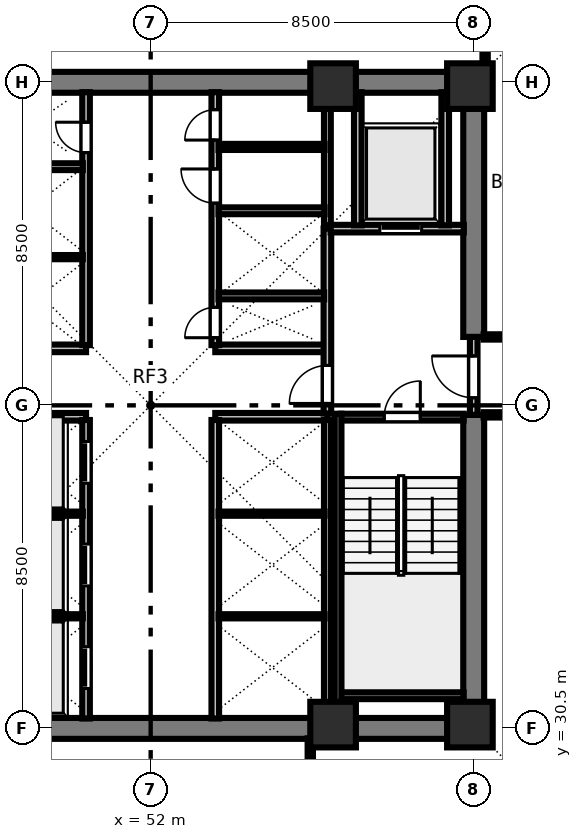
"""IFC4 building model, lengths in metres.
Left out: names, types, materials, properties, quantities, classifications, styles, units other than length and angle.
Written with IfcOpenShell. Run it as: python <this file> out.ifc"""

import sys

from ifc_helpers import new_model, si_unit, direction, frame, frame_2d, origin, origin_2d, place, context, subcontext, project, spatial, rectangle, extrude, element, fill, save


model = new_model("IFC4")
c1 = context("Model", 3, precision=1e-05, world=origin(), true_north=direction((0.0, 1.0)))
c2 = subcontext(c1, "Body", "Model", "MODEL_VIEW")
j1 = project(units=[si_unit("LENGTHUNIT", "METRE"), si_unit("PLANEANGLEUNIT", "RADIAN")], contexts=[c1])
p1 = place(None, origin())
s1 = spatial("IfcSite", under=j1, at=p1, CompositionType="ELEMENT")
p2 = place(p1, origin())
s2 = spatial("IfcBuilding", under=s1, at=p2, CompositionType="ELEMENT")
p3 = place(p2, frame((0.0, 0.0, 23.5)))
s3 = spatial("IfcBuildingStorey", under=s2, at=p3, CompositionType="ELEMENT", Elevation=23.5)
for number, where, z_axis, x_axis in (
    (1, (56.8, 30.6, 0.0), (0.0, 0.0, 1.0), (1.0, 0.0, 0.0)),
    (2, (60.4, 30.6, 0.0), (0.0, 0.0, 1.0), (1.0, 0.0, 0.0)),
    (3, (56.8, 47.4, 0.0), (0.0, 0.0, 1.0), (1.0, 0.0, 0.0)),
    (4, (60.4, 47.4, 0.0), (0.0, 0.0, 1.0), (1.0, 0.0, 0.0)),
):
    element("IfcColumn", number, at=place(p3, frame(where, z_axis=z_axis, x_axis=x_axis)), inside=s3, PredefinedType="COLUMN", context=c2, shape_type="SweptSolid", body=[
        extrude(rectangle(XDim=1.2, YDim=1.2, at=origin_2d()), origin(), (0.0, 0.0, 1.0), 3.5),
    ])
for number, where, z_axis, x_axis in (
    (5, (43.225, 30.5, 0.0), (0.0, 0.0, 1.0), (1.0, 0.0, 0.0)),
    (6, (43.225, 47.5, 0.0), (0.0, 0.0, 1.0), (1.0, 0.0, 0.0)),
):
    element("IfcWall", number, at=place(p3, frame(where, z_axis=z_axis, x_axis=x_axis)), inside=s3, PredefinedType="SHEAR", context=c2, shape_type="SweptSolid", body=[
        extrude(rectangle(XDim=17.55, YDim=0.55, at=frame_2d((8.775, 0.0))), origin(), (0.0, 0.0, 1.0), 3.28),
    ])
p4 = place(p3, frame((60.5, 30.765, 0.0), z_axis=(0.0, 0.0, 1.0), x_axis=(0.0, 1.0, 0.0)))
e7 = element("IfcWall", 7, at=p4, inside=s3, PredefinedType="SHEAR", context=c2, shape_type="SweptSolid", body=[
    extrude(rectangle(XDim=7.985, YDim=0.55, at=frame_2d((3.993, 0.0))), origin(), (0.0, 0.0, 1.0), 3.28),
])
p5 = place(p3, frame((60.5, 40.8, 0.0), z_axis=(0.0, 0.0, 1.0), x_axis=(0.0, 1.0, 0.0)))
e8 = element("IfcWall", 8, at=p5, inside=s3, PredefinedType="SHEAR", context=c2, shape_type="SweptSolid", body=[
    extrude(rectangle(XDim=6.435, YDim=0.55, at=frame_2d((3.218, 0.0))), origin(), (0.0, 0.0, 1.0), 3.28),
])
for number, where, z_axis, x_axis in (
    (9, (47.35, 38.7, 0.0), (0.0, 0.0, 1.0), (1.0, 0.0, 0.0)),
    (10, (47.35, 40.5, 0.0), (0.0, 0.0, 1.0), (1.0, 0.0, 0.0)),
    (11, (53.7, 38.7, 0.0), (0.0, 0.0, 1.0), (1.0, 0.0, 0.0)),
    (12, (53.7, 40.5, 0.0), (0.0, 0.0, 1.0), (1.0, 0.0, 0.0)),
):
    element("IfcWall", number, at=place(p3, frame(where, z_axis=z_axis, x_axis=x_axis)), inside=s3, PredefinedType="SOLIDWALL", context=c2, shape_type="SweptSolid", body=[
        extrude(rectangle(XDim=2.95, YDim=0.2, at=frame_2d((1.475, 0.0))), origin(), (0.0, 0.0, 1.0), 3.28),
    ])
p6 = place(p3, frame((50.3, 30.76, 0.0), z_axis=(0.0, 0.0, 1.0), x_axis=(0.0, 1.0, 0.0)))
e13 = element("IfcWall", 13, at=p6, inside=s3, PredefinedType="SOLIDWALL", context=c2, shape_type="SweptSolid", body=[
    extrude(rectangle(XDim=7.855, YDim=0.2, at=frame_2d((3.927, 0.0))), origin(), (0.0, 0.0, 1.0), 3.28),
])
p7 = place(p6, frame((0.79, 0.0, 0.0)))
e14 = element("IfcOpeningElement", 14, at=p7, cuts=e13, PredefinedType="OPENING", context=c2, shape_type="SweptSolid", body=[
    extrude(rectangle(XDim=1.1, YDim=2.2, at=frame_2d((0.55, 1.1))), frame((0.0, 0.11, 0.0), z_axis=(0.0, -1.0, 0.0), x_axis=(1.0, 0.0, 0.0)), (0.0, 0.0, 1.0), 0.22),
])
p8 = place(p6, frame((3.49, 0.0, 0.0)))
e15 = element("IfcOpeningElement", 15, at=p8, cuts=e13, PredefinedType="OPENING", context=c2, shape_type="SweptSolid", body=[
    extrude(rectangle(XDim=1.1, YDim=2.2, at=frame_2d((0.55, 1.1))), frame((0.0, 0.11, 0.0), z_axis=(0.0, -1.0, 0.0), x_axis=(1.0, 0.0, 0.0)), (0.0, 0.0, 1.0), 0.22),
])
p9 = place(p6, frame((6.19, 0.0, 0.0)))
e16 = element("IfcOpeningElement", 16, at=p9, cuts=e13, PredefinedType="OPENING", context=c2, shape_type="SweptSolid", body=[
    extrude(rectangle(XDim=1.1, YDim=2.2, at=frame_2d((0.55, 1.1))), frame((0.0, 0.11, 0.0), z_axis=(0.0, -1.0, 0.0), x_axis=(1.0, 0.0, 0.0)), (0.0, 0.0, 1.0), 0.22),
])
p10 = place(p3, frame((53.7, 30.76, 0.0), z_axis=(0.0, 0.0, 1.0), x_axis=(0.0, 1.0, 0.0)))
e17 = element("IfcWall", 17, at=p10, inside=s3, PredefinedType="SOLIDWALL", context=c2, shape_type="SweptSolid", body=[
    extrude(rectangle(XDim=7.855, YDim=0.2, at=frame_2d((3.927, 0.0))), origin(), (0.0, 0.0, 1.0), 3.28),
])
p11 = place(p3, frame((50.3, 40.585, 0.0), z_axis=(0.0, 0.0, 1.0), x_axis=(0.0, 1.0, 0.0)))
e18 = element("IfcWall", 18, at=p11, inside=s3, PredefinedType="SOLIDWALL", context=c2, shape_type="SweptSolid", body=[
    extrude(rectangle(XDim=6.655, YDim=0.2, at=frame_2d((3.328, 0.0))), origin(), (0.0, 0.0, 1.0), 3.28),
])
p12 = place(p11, frame((5.065, 0.0, 0.0)))
e19 = element("IfcOpeningElement", 19, at=p12, cuts=e18, PredefinedType="OPENING", context=c2, shape_type="SweptSolid", body=[
    extrude(rectangle(XDim=0.8, YDim=2.08, at=frame_2d((0.4, 1.04))), frame((0.0, 0.11, 0.0), z_axis=(0.0, -1.0, 0.0), x_axis=(1.0, 0.0, 0.0)), (0.0, 0.0, 1.0), 0.22),
])
p13 = place(p3, frame((53.7, 40.585, 0.0), z_axis=(0.0, 0.0, 1.0), x_axis=(0.0, 1.0, 0.0)))
e20 = element("IfcWall", 20, at=p13, inside=s3, PredefinedType="SOLIDWALL", context=c2, shape_type="SweptSolid", body=[
    extrude(rectangle(XDim=6.655, YDim=0.2, at=frame_2d((3.328, 0.0))), origin(), (0.0, 0.0, 1.0), 3.28),
])
p14 = place(p13, frame((0.195, 0.0, 0.0)))
e21 = element("IfcOpeningElement", 21, at=p14, cuts=e20, PredefinedType="OPENING", context=c2, shape_type="SweptSolid", body=[
    extrude(rectangle(XDim=0.8, YDim=2.08, at=frame_2d((0.4, 1.04))), frame((0.0, 0.11, 0.0), z_axis=(0.0, -1.0, 0.0), x_axis=(1.0, 0.0, 0.0)), (0.0, 0.0, 1.0), 0.22),
])
p15 = place(p13, frame((3.735, 0.0, 0.0)))
e22 = element("IfcOpeningElement", 22, at=p15, cuts=e20, PredefinedType="OPENING", context=c2, shape_type="SweptSolid", body=[
    extrude(rectangle(XDim=0.9, YDim=2.12, at=frame_2d((0.45, 1.06))), frame((0.0, 0.11, 0.0), z_axis=(0.0, -1.0, 0.0), x_axis=(1.0, 0.0, 0.0)), (0.0, 0.0, 1.0), 0.22),
])
p16 = place(p13, frame((5.395, 0.0, 0.0)))
e23 = element("IfcOpeningElement", 23, at=p16, cuts=e20, PredefinedType="OPENING", context=c2, shape_type="SweptSolid", body=[
    extrude(rectangle(XDim=0.8, YDim=2.1, at=frame_2d((0.4, 1.05))), frame((0.0, 0.11, 0.0), z_axis=(0.0, -1.0, 0.0), x_axis=(1.0, 0.0, 0.0)), (0.0, 0.0, 1.0), 0.22),
])
p17 = place(p3, frame((60.5, 38.75, 0.0), z_axis=(0.0, 0.0, 1.0), x_axis=(0.0, 1.0, 0.0)))
e24 = element("IfcWall", 24, at=p17, inside=s3, PredefinedType="SOLIDWALL", context=c2, shape_type="SweptSolid", body=[
    extrude(rectangle(XDim=2.05, YDim=0.2, at=frame_2d((1.025, 0.0))), origin(), (0.0, 0.0, 1.0), 3.28),
])
p18 = place(p17, frame((0.45, 0.0, 0.0)))
e25 = element("IfcOpeningElement", 25, at=p18, cuts=e24, PredefinedType="OPENING", context=c2, shape_type="SweptSolid", body=[
    extrude(rectangle(XDim=1.1, YDim=2.15, at=frame_2d((0.55, 1.075))), frame((0.0, 0.11, 0.0), z_axis=(0.0, -1.0, 0.0), x_axis=(1.0, 0.0, 0.0)), (0.0, 0.0, 1.0), 0.22),
])
p19 = place(p3, frame((56.65, 38.785, 0.0), z_axis=(0.0, 0.0, 1.0), x_axis=(0.0, 1.0, 0.0)))
e26 = element("IfcWall", 26, at=p19, inside=s3, PredefinedType="SOLIDWALL", context=c2, shape_type="SweptSolid", body=[
    extrude(rectangle(XDim=4.865, YDim=0.2, at=frame_2d((2.433, 0.0))), origin(), (0.0, 0.0, 1.0), 3.28),
])
p20 = place(p19, frame((0.265, 0.0, 0.0)))
e27 = element("IfcOpeningElement", 27, at=p20, cuts=e26, PredefinedType="OPENING", context=c2, shape_type="SweptSolid", body=[
    extrude(rectangle(XDim=1.0, YDim=2.15, at=frame_2d((0.5, 1.075))), frame((0.0, 0.11, 0.0), z_axis=(0.0, -1.0, 0.0), x_axis=(1.0, 0.0, 0.0)), (0.0, 0.0, 1.0), 0.22),
])
p21 = place(p3, frame((56.735, 43.65, 0.0), z_axis=(0.0, 0.0, 1.0), x_axis=(1.0, 0.0, 0.0)))
e28 = element("IfcWall", 28, at=p21, inside=s3, PredefinedType="SOLIDWALL", context=c2, shape_type="SweptSolid", body=[
    extrude(rectangle(XDim=3.505, YDim=0.2, at=frame_2d((1.752, 0.0))), origin(), (0.0, 0.0, 1.0), 3.28),
])
p22 = place(p21, frame((1.295, 0.0, 0.0)))
e29 = element("IfcOpeningElement", 29, at=p22, cuts=e28, PredefinedType="OPENING", context=c2, shape_type="SweptSolid", body=[
    extrude(rectangle(XDim=1.1, YDim=2.2, at=frame_2d((0.55, 1.1))), frame((0.0, 0.11, 0.0), z_axis=(0.0, -1.0, 0.0), x_axis=(1.0, 0.0, 0.0)), (0.0, 0.0, 1.0), 0.22),
])
for number, where, z_axis, x_axis in (
    (30, (57.45, 43.735, 0.0), (0.0, 0.0, 1.0), (0.0, 1.0, 0.0)),
    (31, (59.75, 43.735, 0.0), (0.0, 0.0, 1.0), (0.0, 1.0, 0.0)),
):
    element("IfcWall", number, at=place(p3, frame(where, z_axis=z_axis, x_axis=x_axis)), inside=s3, PredefinedType="SOLIDWALL", context=c2, shape_type="SweptSolid", body=[
        extrude(rectangle(XDim=3.505, YDim=0.2, at=frame_2d((1.752, 0.0))), origin(), (0.0, 0.0, 1.0), 3.28),
    ])
for number, where, z_axis, x_axis in (
    (32, (47.425, 33.45, 0.0), (0.0, 0.0, 1.0), (1.0, 0.0, 0.0)),
    (33, (47.425, 36.15, 0.0), (0.0, 0.0, 1.0), (1.0, 0.0, 0.0)),
):
    element("IfcWall", number, at=place(p3, frame(where, z_axis=z_axis, x_axis=x_axis)), inside=s3, PredefinedType="PARTITIONING", context=c2, shape_type="SweptSolid", body=[
        extrude(rectangle(XDim=2.79, YDim=0.11, at=frame_2d((1.395, 0.0))), origin(), (0.0, 0.0, 1.0), 3.28),
    ])
p23 = place(p3, frame((56.65, 30.76, 0.0), z_axis=(0.0, 0.0, 1.0), x_axis=(0.0, 1.0, 0.0)))
e34 = element("IfcWall", 34, at=p23, inside=s3, PredefinedType="SOLIDWALL", context=c2, shape_type="SweptSolid", body=[
    extrude(rectangle(XDim=7.855, YDim=0.18, at=frame_2d((3.927, 0.0))), origin(), (0.0, 0.0, 1.0), 3.28),
])
for number, where, z_axis, x_axis in (
    (35, (53.785, 33.45, 0.0), (0.0, 0.0, 1.0), (1.0, 0.0, 0.0)),
    (36, (53.785, 36.15, 0.0), (0.0, 0.0, 1.0), (1.0, 0.0, 0.0)),
):
    element("IfcWall", number, at=place(p3, frame(where, z_axis=z_axis, x_axis=x_axis)), inside=s3, PredefinedType="PARTITIONING", context=c2, shape_type="SweptSolid", body=[
        extrude(rectangle(XDim=2.79, YDim=0.11, at=frame_2d((1.395, 0.0))), origin(), (0.0, 0.0, 1.0), 3.28),
    ])
p24 = place(p3, frame((47.435, 42.9, 0.0), z_axis=(0.0, 0.0, 1.0), x_axis=(1.0, 0.0, 0.0)))
e37 = element("IfcWall", 37, at=p24, inside=s3, PredefinedType="PARTITIONING", context=c2, shape_type="SweptSolid", body=[
    extrude(rectangle(XDim=2.78, YDim=0.11, at=frame_2d((1.39, 0.0))), origin(), (0.0, 0.0, 1.0), 3.28),
])
p25 = place(p3, frame((47.425, 45.28, 0.0), z_axis=(0.0, 0.0, 1.0), x_axis=(1.0, 0.0, 0.0)))
e38 = element("IfcWall", 38, at=p25, inside=s3, PredefinedType="SOLIDWALL", context=c2, shape_type="SweptSolid", body=[
    extrude(rectangle(XDim=2.79, YDim=0.18, at=frame_2d((1.395, 0.0))), origin(), (0.0, 0.0, 1.0), 3.28),
])
p26 = place(p3, frame((56.65, 43.735, 0.0), z_axis=(0.0, 0.0, 1.0), x_axis=(0.0, 1.0, 0.0)))
e39 = element("IfcWall", 39, at=p26, inside=s3, PredefinedType="SOLIDWALL", context=c2, shape_type="SweptSolid", body=[
    extrude(rectangle(XDim=3.505, YDim=0.18, at=frame_2d((1.752, 0.0))), origin(), (0.0, 0.0, 1.0), 3.28),
])
p27 = place(p3, frame((53.785, 41.88, 0.0), z_axis=(0.0, 0.0, 1.0), x_axis=(1.0, 0.0, 0.0)))
e40 = element("IfcWall", 40, at=p27, inside=s3, PredefinedType="SOLIDWALL", context=c2, shape_type="SweptSolid", body=[
    extrude(rectangle(XDim=2.78, YDim=0.18, at=frame_2d((1.39, 0.0))), origin(), (0.0, 0.0, 1.0), 3.28),
])
p28 = place(p3, frame((53.785, 44.12, 0.0), z_axis=(0.0, 0.0, 1.0), x_axis=(1.0, 0.0, 0.0)))
e41 = element("IfcWall", 41, at=p28, inside=s3, PredefinedType="SOLIDWALL", context=c2, shape_type="SweptSolid", body=[
    extrude(rectangle(XDim=2.79, YDim=0.18, at=frame_2d((1.395, 0.0))), origin(), (0.0, 0.0, 1.0), 3.28),
])
p29 = place(p3, frame((53.785, 45.8, 0.0), z_axis=(0.0, 0.0, 1.0), x_axis=(1.0, 0.0, 0.0)))
e42 = element("IfcWall", 42, at=p29, inside=s3, PredefinedType="PARTITIONING", context=c2, shape_type="SweptSolid", body=[
    extrude(rectangle(XDim=2.79, YDim=0.16, at=frame_2d((1.395, 0.0))), origin(), (0.0, 0.0, 1.0), 3.28),
])
for number, where, z_axis, x_axis in (
    (43, (60.76, 38.75, 0.0), (0.0, 0.0, 1.0), (1.0, 0.0, 0.0)),
    (44, (60.76, 40.8, 0.0), (0.0, 0.0, 1.0), (1.0, 0.0, 0.0)),
):
    element("IfcWall", number, at=place(p3, frame(where, z_axis=z_axis, x_axis=x_axis)), inside=s3, PredefinedType="PARTITIONING", context=c2, shape_type="SweptSolid", body=[
        extrude(rectangle(XDim=5.985, YDim=0.14, at=frame_2d((2.993, 0.0))), origin(), (0.0, 0.0, 1.0), 3.28),
    ])
p30 = place(p3, frame((56.2, 23.655, 0.0), z_axis=(0.0, 0.0, 1.0), x_axis=(0.0, 1.0, 0.0)))
e45 = element("IfcWall", 45, at=p30, inside=s3, PredefinedType="PARTITIONING", context=c2, shape_type="SweptSolid", body=[
    extrude(rectangle(XDim=6.585, YDim=0.14, at=frame_2d((3.292, 0.0))), origin(), (0.0, 0.0, 1.0), 2.849),
])
p31 = place(p3, frame((60.8, 47.76, 0.0), z_axis=(0.0, 0.0, 1.0), x_axis=(0.0, 1.0, 0.0)))
e46 = element("IfcWall", 46, at=p31, inside=s3, PredefinedType="PARTITIONING", context=c2, shape_type="SweptSolid", body=[
    extrude(rectangle(XDim=6.585, YDim=0.14, at=frame_2d((3.292, 0.0))), origin(), (0.0, 0.0, 1.0), 2.439),
])
p32 = place(p3, frame((57.005, 38.69, 0.0), z_axis=(0.0, 0.0, 1.0), x_axis=(1.0, 0.0, 0.0)))
e47 = element("IfcWall", 47, at=p32, inside=s3, PredefinedType="SOLIDWALL", context=c2, shape_type="SweptSolid", body=[
    extrude(rectangle(XDim=3.23, YDim=0.18, at=frame_2d((1.615, 0.0))), origin(), (0.0, 0.0, 1.0), 3.28),
])
p33 = place(p32, frame((1.14, 0.0, 0.0)))
e48 = element("IfcOpeningElement", 48, at=p33, cuts=e47, PredefinedType="OPENING", context=c2, shape_type="SweptSolid", body=[
    extrude(rectangle(XDim=0.95, YDim=2.15, at=frame_2d((0.475, 1.075))), frame((0.0, 0.1, 0.0), z_axis=(0.0, -1.0, 0.0), x_axis=(1.0, 0.0, 0.0)), (0.0, 0.0, 1.0), 0.2),
])
p34 = place(p3, frame((57.005, 31.36, 0.0), z_axis=(0.0, 0.0, 1.0), x_axis=(1.0, 0.0, 0.0)))
e49 = element("IfcWall", 49, at=p34, inside=s3, PredefinedType="SOLIDWALL", context=c2, shape_type="SweptSolid", body=[
    extrude(rectangle(XDim=3.23, YDim=0.18, at=frame_2d((1.615, 0.0))), origin(), (0.0, 0.0, 1.0), 3.28),
])
p35 = place(p3, frame((56.93, 38.78, 0.0), z_axis=(0.0, 0.0, 1.0), x_axis=(0.0, -1.0, 0.0)))
e50 = element("IfcWall", 50, at=p35, inside=s3, PredefinedType="SOLIDWALL", context=c2, shape_type="SweptSolid", body=[
    extrude(rectangle(XDim=8.017, YDim=0.18, at=frame_2d((4.009, 0.0))), origin(), (0.0, 0.0, 1.0), 3.28),
])
p36 = place(p18, origin())
e51 = element("IfcDoor", 51, at=p36, inside=s3, OperationType="SINGLE_SWING_RIGHT", PredefinedType="DOOR", context=c2, shape_type="SweptSolid", body=[
    extrude(rectangle(XDim=1.1, YDim=2.15, at=frame_2d((0.55, 1.075))), frame((0.0, 0.025, 0.0), z_axis=(0.0, -1.0, 0.0), x_axis=(1.0, 0.0, 0.0)), (0.0, 0.0, 1.0), 0.05),
])
fill(e25, e51)
p37 = place(p20, origin())
e52 = element("IfcDoor", 52, at=p37, inside=s3, OperationType="SINGLE_SWING_LEFT", PredefinedType="DOOR", context=c2, shape_type="SweptSolid", body=[
    extrude(rectangle(XDim=1.0, YDim=2.15, at=frame_2d((0.5, 1.075))), frame((0.0, 0.025, 0.0), z_axis=(0.0, -1.0, 0.0), x_axis=(1.0, 0.0, 0.0)), (0.0, 0.0, 1.0), 0.05),
])
fill(e27, e52)
p38 = place(p22, origin())
e53 = element("IfcDoor", 53, at=p38, inside=s3, OperationType="SLIDING_TO_LEFT", PredefinedType="DOOR", context=c2, shape_type="SweptSolid", body=[
    extrude(rectangle(XDim=1.1, YDim=2.2, at=frame_2d((0.55, 1.1))), frame((0.0, 0.025, 0.0), z_axis=(0.0, -1.0, 0.0), x_axis=(1.0, 0.0, 0.0)), (0.0, 0.0, 1.0), 0.05),
])
fill(e29, e53)
p39 = place(p7, origin())
e54 = element("IfcDoor", 54, at=p39, inside=s3, OperationType="SLIDING_TO_LEFT", PredefinedType="DOOR", context=c2, shape_type="SweptSolid", body=[
    extrude(rectangle(XDim=1.1, YDim=2.2, at=frame_2d((0.55, 1.1))), frame((0.0, 0.025, 0.0), z_axis=(0.0, -1.0, 0.0), x_axis=(1.0, 0.0, 0.0)), (0.0, 0.0, 1.0), 0.05),
])
fill(e14, e54)
p40 = place(p8, origin())
e55 = element("IfcDoor", 55, at=p40, inside=s3, OperationType="SLIDING_TO_LEFT", PredefinedType="DOOR", context=c2, shape_type="SweptSolid", body=[
    extrude(rectangle(XDim=1.1, YDim=2.2, at=frame_2d((0.55, 1.1))), frame((0.0, 0.025, 0.0), z_axis=(0.0, -1.0, 0.0), x_axis=(1.0, 0.0, 0.0)), (0.0, 0.0, 1.0), 0.05),
])
fill(e15, e55)
p41 = place(p9, origin())
e56 = element("IfcDoor", 56, at=p41, inside=s3, OperationType="SLIDING_TO_LEFT", PredefinedType="DOOR", context=c2, shape_type="SweptSolid", body=[
    extrude(rectangle(XDim=1.1, YDim=2.2, at=frame_2d((0.55, 1.1))), frame((0.0, 0.025, 0.0), z_axis=(0.0, -1.0, 0.0), x_axis=(1.0, 0.0, 0.0)), (0.0, 0.0, 1.0), 0.05),
])
fill(e16, e56)
p42 = place(p12, origin())
e57 = element("IfcDoor", 57, at=p42, inside=s3, OperationType="SINGLE_SWING_RIGHT", PredefinedType="DOOR", context=c2, shape_type="SweptSolid", body=[
    extrude(rectangle(XDim=0.8, YDim=2.08, at=frame_2d((0.4, 1.04))), frame((0.0, 0.025, 0.0), z_axis=(0.0, -1.0, 0.0), x_axis=(1.0, 0.0, 0.0)), (0.0, 0.0, 1.0), 0.05),
])
fill(e19, e57)
p43 = place(p14, origin())
e58 = element("IfcDoor", 58, at=p43, inside=s3, OperationType="SINGLE_SWING_LEFT", PredefinedType="DOOR", context=c2, shape_type="SweptSolid", body=[
    extrude(rectangle(XDim=0.8, YDim=2.08, at=frame_2d((0.4, 1.04))), frame((0.0, 0.025, 0.0), z_axis=(0.0, -1.0, 0.0), x_axis=(1.0, 0.0, 0.0)), (0.0, 0.0, 1.0), 0.05),
])
fill(e21, e58)
p44 = place(p15, origin())
e59 = element("IfcDoor", 59, at=p44, inside=s3, OperationType="SINGLE_SWING_RIGHT", PredefinedType="DOOR", context=c2, shape_type="SweptSolid", body=[
    extrude(rectangle(XDim=0.9, YDim=2.12, at=frame_2d((0.45, 1.06))), frame((0.0, 0.025, 0.0), z_axis=(0.0, -1.0, 0.0), x_axis=(1.0, 0.0, 0.0)), (0.0, 0.0, 1.0), 0.05),
])
fill(e22, e59)
p45 = place(p16, origin())
e60 = element("IfcDoor", 60, at=p45, inside=s3, OperationType="SINGLE_SWING_LEFT", PredefinedType="DOOR", context=c2, shape_type="SweptSolid", body=[
    extrude(rectangle(XDim=0.8, YDim=2.1, at=frame_2d((0.4, 1.05))), frame((0.0, 0.025, 0.0), z_axis=(0.0, -1.0, 0.0), x_axis=(1.0, 0.0, 0.0)), (0.0, 0.0, 1.0), 0.05),
])
fill(e23, e60)
p46 = place(p33, origin())
e61 = element("IfcDoor", 61, at=p46, inside=s3, OperationType="SINGLE_SWING_RIGHT", PredefinedType="DOOR", context=c2, shape_type="SweptSolid", body=[
    extrude(rectangle(XDim=0.95, YDim=2.15, at=frame_2d((0.475, 1.075))), frame((0.0, 0.025, 0.0), z_axis=(0.0, -1.0, 0.0), x_axis=(1.0, 0.0, 0.0)), (0.0, 0.0, 1.0), 0.05),
])
fill(e48, e61)
save(model, sys.argv[1])
